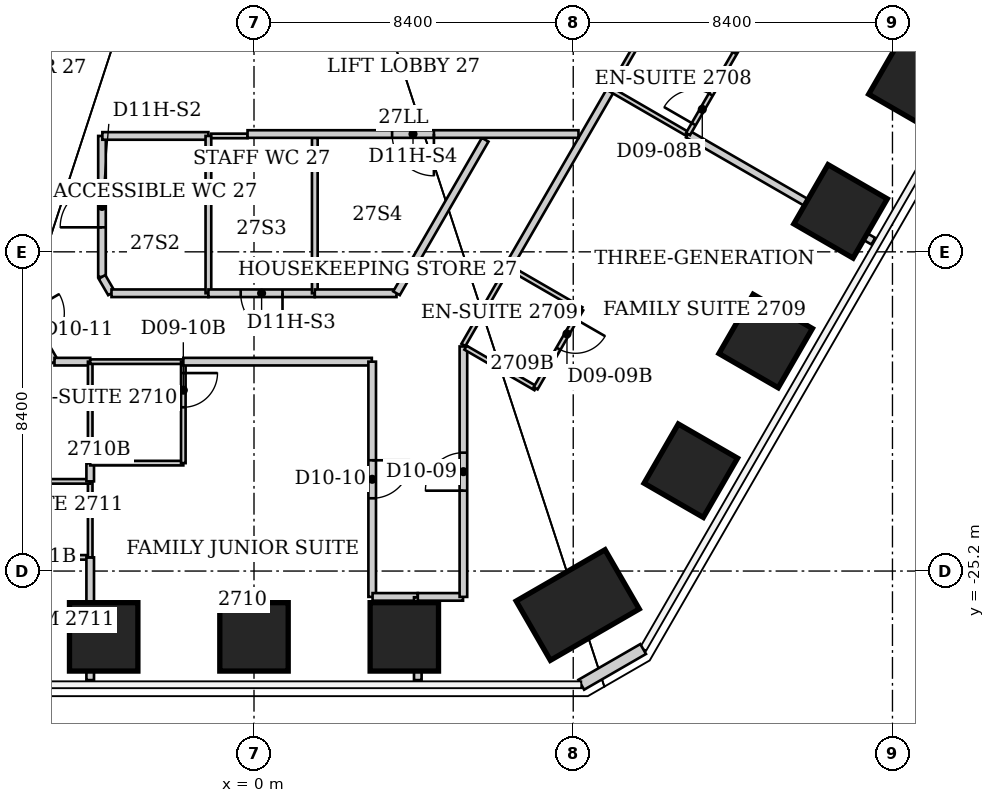
"""IFC4 building model, lengths in metres.
Left out: names, types, materials, properties, quantities, classifications, styles, units other than length and angle.
Written with IfcOpenShell. Run it as: python <this file> out.ifc"""

import sys

from ifc_helpers import new_model, si_unit, direction, frame, frame_2d, origin, origin_2d, place, context, subcontext, project, spatial, rectangle, extrude, element, fill, save


model = new_model("IFC4")
c1 = context("Model", 3, precision=1e-05, world=origin(), true_north=direction((0.0, 1.0)))
c2 = subcontext(c1, "Body", "Model", "MODEL_VIEW")
j1 = project(units=[si_unit("LENGTHUNIT", "METRE"), si_unit("PLANEANGLEUNIT", "RADIAN")], contexts=[c1])
p1 = place(None, origin())
s1 = spatial("IfcSite", under=j1, at=p1, CompositionType="ELEMENT")
p2 = place(p1, origin())
s2 = spatial("IfcBuilding", under=s1, at=p2, CompositionType="ELEMENT")
p3 = place(p2, frame((0.0, 0.0, 112.0)))
s3 = spatial("IfcBuildingStorey", under=s2, at=p3, CompositionType="ELEMENT", Elevation=112.0)
for number, where, z_axis, x_axis in (
    (1, (17.404, -12.323, 0.0), (0.0, 0.0, 1.0), (0.866, -0.5, 0.0)),
    (2, (15.434, -15.735, 0.0), (0.0, 0.0, 1.0), (0.866, -0.5, 0.0)),
    (3, (13.464, -19.147, 0.0), (0.0, 0.0, 1.0), (0.866, -0.5, 0.0)),
    (4, (11.494, -22.559, 0.0), (0.0, 0.0, 1.0), (0.866, -0.5, 0.0)),
):
    element("IfcColumn", number, at=place(p3, frame(where, z_axis=z_axis, x_axis=x_axis)), inside=s3, PredefinedType="COLUMN", context=c2, shape_type="SweptSolid", body=[
        extrude(rectangle(XDim=1.8, YDim=1.8, at=origin_2d()), origin(), (0.0, 0.0, 1.0), 3.8),
    ])
p4 = place(p3, frame((8.518, -26.094, 0.0), z_axis=(0.0, 0.0, 1.0), x_axis=(0.5, -0.866025403784, 0.0)))
e5 = element("IfcColumn", 5, at=p4, inside=s3, PredefinedType="COLUMN", context=c2, shape_type="SweptSolid", body=[
    extrude(rectangle(XDim=1.8, YDim=2.7, at=origin_2d()), origin(), (0.0, 0.0, 1.0), 3.8),
])
for number, where, z_axis, x_axis in (
    (6, (3.955, -26.932, 0.0), (0.0, 0.0, 1.0), (0.0, -1.0, 0.0)),
    (7, (0.0, -26.932, 0.0), (0.0, 0.0, 1.0), (0.0, -1.0, 0.0)),
    (8, (-3.955, -26.932, 0.0), (0.0, 0.0, 1.0), (0.0, -1.0, 0.0)),
):
    element("IfcColumn", number, at=place(p3, frame(where, z_axis=z_axis, x_axis=x_axis)), inside=s3, PredefinedType="COLUMN", context=c2, shape_type="SweptSolid", body=[
        extrude(rectangle(XDim=1.8, YDim=1.8, at=origin_2d()), origin(), (0.0, 0.0, 1.0), 3.8),
    ])
p5 = place(p3, frame((10.24, -27.252, 0.0), z_axis=(0.0, 0.0, 1.0), x_axis=(-0.866045024864, -0.499966013754, 0.0)))
e9 = element("IfcWall", 9, at=p5, inside=s3, PredefinedType="SOLIDWALL", context=c2, shape_type="SweptSolid", body=[
    extrude(rectangle(XDim=1.88, YDim=0.3, at=frame_2d((0.94, 0.0))), origin(), (0.0, 0.0, 1.0), 3.64),
])
p6 = place(p3, frame((-6.71, -24.84, 0.0), z_axis=(0.0, 0.0, 1.0), x_axis=(1.0, 0.0, 0.0)))
e10 = element("IfcWall", 10, at=p6, inside=s3, PredefinedType="PARTITIONING", context=c2, shape_type="SweptSolid", body=[
    extrude(rectangle(XDim=2.4, YDim=0.12, at=frame_2d((1.2, 0.0))), origin(), (0.0, 0.0, 1.0), 3.64),
])
p7 = place(p6, frame((0.45, 0.0, 0.0)))
e11 = element("IfcOpeningElement", 11, at=p7, cuts=e10, PredefinedType="OPENING", context=c2, shape_type="SweptSolid", body=[
    extrude(rectangle(XDim=0.9, YDim=2.03, at=frame_2d((0.45, 1.015))), frame((0.0, 0.06, 0.0), z_axis=(0.0, -1.0, 0.0), x_axis=(1.0, 0.0, 0.0)), (0.0, 0.0, 1.0), 0.12),
])
p8 = place(p3, frame((-6.23, -18.0, 0.0), z_axis=(0.0, 0.0, 1.0), x_axis=(0.501647016168, -0.86507240805, 0.0)))
e12 = element("IfcWall", 12, at=p8, inside=s3, PredefinedType="PARTITIONING", context=c2, shape_type="SweptSolid", body=[
    extrude(rectangle(XDim=1.954, YDim=0.2, at=frame_2d((0.977, 0.0))), origin(), (0.0, 0.0, 1.0), 3.64),
])
p9 = place(p8, frame((0.477, 0.0, 0.0)))
e13 = element("IfcOpeningElement", 13, at=p9, cuts=e12, PredefinedType="OPENING", context=c2, shape_type="SweptSolid", body=[
    extrude(rectangle(XDim=1.0, YDim=2.13, at=frame_2d((0.5, 1.065))), frame((0.0, 0.1, 0.0), z_axis=(0.0, -1.0, 0.0), x_axis=(1.0, 0.0, 0.0)), (0.0, 0.0, 1.0), 0.2),
])
p10 = place(p3, frame((-5.25, -19.69, 0.0), z_axis=(0.0, 0.0, 1.0), x_axis=(1.0, 0.0, 0.0)))
e14 = element("IfcWall", 14, at=p10, inside=s3, PredefinedType="PARTITIONING", context=c2, shape_type="SweptSolid", body=[
    extrude(rectangle(XDim=0.94, YDim=0.2, at=frame_2d((0.47, 0.0))), origin(), (0.0, 0.0, 1.0), 3.64),
])
p11 = place(p3, frame((-4.31, -28.07, 0.0), z_axis=(0.0, 0.0, 1.0), x_axis=(0.0, 1.0, 0.0)))
e15 = element("IfcWall", 15, at=p11, inside=s3, PredefinedType="PARTITIONING", context=c2, shape_type="SweptSolid", body=[
    extrude(rectangle(XDim=3.23, YDim=0.2, at=frame_2d((1.615, 0.0))), origin(), (0.0, 0.0, 1.0), 3.64),
])
p12 = place(p3, frame((-4.31, -24.84, 0.0), z_axis=(0.0, 0.0, 1.0), x_axis=(0.0, 1.0, 0.0)))
e16 = element("IfcWall", 16, at=p12, inside=s3, PredefinedType="PARTITIONING", context=c2, shape_type="SweptSolid", body=[
    extrude(rectangle(XDim=2.0, YDim=0.12, at=frame_2d((1.0, 0.0))), origin(), (0.0, 0.0, 1.0), 3.64),
])
p13 = place(p3, frame((-4.31, -22.84, 0.0), z_axis=(0.0, 0.0, 1.0), x_axis=(-1.0, 0.0, 0.0)))
e17 = element("IfcWall", 17, at=p13, inside=s3, PredefinedType="PARTITIONING", context=c2, shape_type="SweptSolid", body=[
    extrude(rectangle(XDim=2.4, YDim=0.12, at=frame_2d((1.2, 0.0))), origin(), (0.0, 0.0, 1.0), 3.64),
])
p14 = place(p3, frame((-4.31, -22.84, 0.0), z_axis=(0.0, 0.0, 1.0), x_axis=(0.0, 1.0, 0.0)))
e18 = element("IfcWall", 18, at=p14, inside=s3, PredefinedType="PARTITIONING", context=c2, shape_type="SweptSolid", body=[
    extrude(rectangle(XDim=0.48, YDim=0.2, at=frame_2d((0.24, 0.0))), origin(), (0.0, 0.0, 1.0), 3.64),
])
p15 = place(p3, frame((-4.31, -22.36, 0.0), z_axis=(0.0, 0.0, 1.0), x_axis=(0.0, 1.0, 0.0)))
e19 = element("IfcWall", 19, at=p15, inside=s3, PredefinedType="PARTITIONING", context=c2, shape_type="SweptSolid", body=[
    extrude(rectangle(XDim=2.67, YDim=0.12, at=frame_2d((1.335, 0.0))), origin(), (0.0, 0.0, 1.0), 3.64),
])
for number, where, z_axis, x_axis in (
    (20, (-4.31, -22.36, 0.0), (0.0, 0.0, 1.0), (1.0, 0.0, 0.0)),
    (21, (-4.31, -19.69, 0.0), (0.0, 0.0, 1.0), (1.0, 0.0, 0.0)),
):
    element("IfcWall", number, at=place(p3, frame(where, z_axis=z_axis, x_axis=x_axis)), inside=s3, PredefinedType="PARTITIONING", context=c2, shape_type="SweptSolid", body=[
        extrude(rectangle(XDim=2.45, YDim=0.12, at=frame_2d((1.225, 0.0))), origin(), (0.0, 0.0, 1.0), 3.64),
    ])
p16 = place(p3, frame((-4.0, -17.46, 0.0), z_axis=(0.0, 0.0, 1.0), x_axis=(0.0, 1.0, 0.0)))
e22 = element("IfcWall", 22, at=p16, inside=s3, PredefinedType="PARTITIONING", context=c2, shape_type="SweptSolid", body=[
    extrude(rectangle(XDim=3.71, YDim=0.2, at=frame_2d((1.855, 0.0))), origin(), (0.0, 0.0, 1.0), 2.878),
])
p17 = place(p16, frame((1.305, 0.0, 0.0)))
e23 = element("IfcOpeningElement", 23, at=p17, cuts=e22, PredefinedType="OPENING", context=c2, shape_type="SweptSolid", body=[
    extrude(rectangle(XDim=1.1, YDim=2.2, at=frame_2d((0.55, 1.1))), frame((0.0, 0.1, 0.0), z_axis=(0.0, -1.0, 0.0), x_axis=(1.0, 0.0, 0.0)), (0.0, 0.0, 1.0), 0.2),
])
p18 = place(p3, frame((-3.99, -13.75, 0.0), z_axis=(0.0, 0.0, 1.0), x_axis=(1.0, 0.0, 0.0)))
e24 = element("IfcWall", 24, at=p18, inside=s3, PredefinedType="PARTITIONING", context=c2, shape_type="SweptSolid", body=[
    extrude(rectangle(XDim=2.79, YDim=0.2, at=frame_2d((1.395, 0.0))), origin(), (0.0, 0.0, 1.0), 3.64),
])
p19 = place(p3, frame((-3.75, -17.89, 0.0), z_axis=(0.0, 0.0, 1.0), x_axis=(-0.502680181512, 0.864472460588, 0.0)))
e25 = element("IfcWall", 25, at=p19, inside=s3, PredefinedType="PARTITIONING", context=c2, shape_type="SweptSolid", body=[
    extrude(rectangle(XDim=0.497, YDim=0.2, at=frame_2d((0.249, 0.0))), origin(), (0.0, 0.0, 1.0), 3.64),
])
p20 = place(p3, frame((-1.86, -22.36, 0.0), z_axis=(0.0, 0.0, 1.0), x_axis=(0.0, 1.0, 0.0)))
e26 = element("IfcWall", 26, at=p20, inside=s3, PredefinedType="PARTITIONING", context=c2, shape_type="SweptSolid", body=[
    extrude(rectangle(XDim=2.67, YDim=0.12, at=frame_2d((1.335, 0.0))), origin(), (0.0, 0.0, 1.0), 2.86),
])
p21 = place(p20, frame((1.47, 0.0, 0.0)))
e27 = element("IfcOpeningElement", 27, at=p21, cuts=e26, PredefinedType="OPENING", context=c2, shape_type="SweptSolid", body=[
    extrude(rectangle(XDim=0.9, YDim=2.03, at=frame_2d((0.45, 1.015))), frame((0.0, 0.06, 0.0), z_axis=(0.0, -1.0, 0.0), x_axis=(1.0, 0.0, 0.0)), (0.0, 0.0, 1.0), 0.12),
])
p22 = place(p3, frame((-1.86, -19.69, 0.0), z_axis=(0.0, 0.0, 1.0), x_axis=(1.0, 0.0, 0.0)))
e28 = element("IfcWall", 28, at=p22, inside=s3, PredefinedType="PARTITIONING", context=c2, shape_type="SweptSolid", body=[
    extrude(rectangle(XDim=4.96, YDim=0.2, at=frame_2d((2.48, 0.0))), origin(), (0.0, 0.0, 1.0), 3.64),
])
p23 = place(p3, frame((-1.2, -17.89, 0.0), z_axis=(0.0, 0.0, 1.0), x_axis=(-1.0, 0.0, 0.0)))
e29 = element("IfcWall", 29, at=p23, inside=s3, PredefinedType="PARTITIONING", context=c2, shape_type="SweptSolid", body=[
    extrude(rectangle(XDim=2.55, YDim=0.2, at=frame_2d((1.275, 0.0))), origin(), (0.0, 0.0, 1.0), 3.64),
])
p24 = place(p3, frame((-1.2, -13.75, 0.0), z_axis=(0.0, 0.0, 1.0), x_axis=(0.0, -1.0, 0.0)))
e30 = element("IfcWall", 30, at=p24, inside=s3, PredefinedType="PARTITIONING", context=c2, shape_type="SweptSolid", body=[
    extrude(rectangle(XDim=4.14, YDim=0.15, at=frame_2d((2.07, 0.0))), origin(), (0.0, 0.0, 1.0), 3.64),
])
p25 = place(p3, frame((-1.125, -13.75, 0.0), z_axis=(0.0, 0.0, 1.0), x_axis=(1.0, 0.0, 0.0)))
e31 = element("IfcWall", 31, at=p25, inside=s3, PredefinedType="PARTITIONING", context=c2, shape_type="SweptSolid", body=[
    extrude(rectangle(XDim=0.955, YDim=0.12, at=frame_2d((0.478, 0.0))), origin(), (0.0, 0.0, 1.0), 3.64),
])
p26 = place(p3, frame((1.6, -17.89, 0.0), z_axis=(0.0, 0.0, 1.0), x_axis=(-1.0, 0.0, 0.0)))
e32 = element("IfcWall", 32, at=p26, inside=s3, PredefinedType="PARTITIONING", context=c2, shape_type="SweptSolid", body=[
    extrude(rectangle(XDim=2.8, YDim=0.2, at=frame_2d((1.4, 0.0))), origin(), (0.0, 0.0, 1.0), 3.64),
])
p27 = place(p26, frame((0.85, 0.0, 0.0)))
e33 = element("IfcOpeningElement", 33, at=p27, cuts=e32, PredefinedType="OPENING", context=c2, shape_type="SweptSolid", body=[
    extrude(rectangle(XDim=1.1, YDim=2.2, at=frame_2d((0.55, 1.1))), frame((0.0, 0.1, 0.0), z_axis=(0.0, -1.0, 0.0), x_axis=(1.0, 0.0, 0.0)), (0.0, 0.0, 1.0), 0.2),
])
p28 = place(p3, frame((1.6, -13.8, 0.0), z_axis=(0.0, 0.0, 1.0), x_axis=(0.0, -1.0, 0.0)))
e34 = element("IfcWall", 34, at=p28, inside=s3, PredefinedType="PARTITIONING", context=c2, shape_type="SweptSolid", body=[
    extrude(rectangle(XDim=4.09, YDim=0.15, at=frame_2d((2.045, 0.0))), origin(), (0.0, 0.0, 1.0), 3.64),
])
p29 = place(p3, frame((3.11, -19.69, 0.0), z_axis=(0.0, 0.0, 1.0), x_axis=(0.0, -1.0, 0.0)))
e35 = element("IfcWall", 35, at=p29, inside=s3, PredefinedType="PARTITIONING", context=c2, shape_type="SweptSolid", body=[
    extrude(rectangle(XDim=6.19, YDim=0.2, at=frame_2d((3.095, 0.0))), origin(), (0.0, 0.0, 1.0), 3.64),
])
p30 = place(p29, frame((2.595, 0.0, 0.0)))
e36 = element("IfcOpeningElement", 36, at=p30, cuts=e35, PredefinedType="OPENING", context=c2, shape_type="SweptSolid", body=[
    extrude(rectangle(XDim=1.0, YDim=2.13, at=frame_2d((0.5, 1.065))), frame((0.0, 0.1, 0.0), z_axis=(0.0, -1.0, 0.0), x_axis=(1.0, 0.0, 0.0)), (0.0, 0.0, 1.0), 0.2),
])
p31 = place(p3, frame((3.12, -25.88, 0.0), z_axis=(0.0, 0.0, 1.0), x_axis=(1.0, 0.0, 0.0)))
e37 = element("IfcWall", 37, at=p31, inside=s3, PredefinedType="PARTITIONING", context=c2, shape_type="SweptSolid", body=[
    extrude(rectangle(XDim=1.19, YDim=0.2, at=frame_2d((0.595, 0.0))), origin(), (0.0, 0.0, 1.0), 3.64),
])
p32 = place(p3, frame((3.75, -17.89, 0.0), z_axis=(0.0, 0.0, 1.0), x_axis=(-1.0, 0.0, 0.0)))
e38 = element("IfcWall", 38, at=p32, inside=s3, PredefinedType="PARTITIONING", context=c2, shape_type="SweptSolid", body=[
    extrude(rectangle(XDim=2.15, YDim=0.2, at=frame_2d((1.075, 0.0))), origin(), (0.0, 0.0, 1.0), 3.64),
])
p33 = place(p3, frame((4.31, -28.07, 0.0), z_axis=(0.0, 0.0, 1.0), x_axis=(0.0, 1.0, 0.0)))
e39 = element("IfcWall", 39, at=p33, inside=s3, PredefinedType="PARTITIONING", context=c2, shape_type="SweptSolid", body=[
    extrude(rectangle(XDim=2.18, YDim=0.2, at=frame_2d((1.09, 0.0))), origin(), (0.0, 0.0, 1.0), 3.64),
])
p34 = place(p3, frame((4.31, -25.88, 0.0), z_axis=(0.0, 0.0, 1.0), x_axis=(1.0, 0.0, 0.0)))
e40 = element("IfcWall", 40, at=p34, inside=s3, PredefinedType="PARTITIONING", context=c2, shape_type="SweptSolid", body=[
    extrude(rectangle(XDim=1.19, YDim=0.2, at=frame_2d((0.595, 0.0))), origin(), (0.0, 0.0, 1.0), 3.64),
])
p35 = place(p3, frame((5.51, -25.88, 0.0), z_axis=(0.0, 0.0, 1.0), x_axis=(0.0, 1.0, 0.0)))
e41 = element("IfcWall", 41, at=p35, inside=s3, PredefinedType="PARTITIONING", context=c2, shape_type="SweptSolid", body=[
    extrude(rectangle(XDim=6.59, YDim=0.2, at=frame_2d((3.295, 0.0))), origin(), (0.0, 0.0, 1.0), 3.64),
])
p36 = place(p35, frame((2.795, 0.0, 0.0)))
e42 = element("IfcOpeningElement", 42, at=p36, cuts=e41, PredefinedType="OPENING", context=c2, shape_type="SweptSolid", body=[
    extrude(rectangle(XDim=1.0, YDim=2.13, at=frame_2d((0.5, 1.065))), frame((0.0, 0.1, 0.0), z_axis=(0.0, -1.0, 0.0), x_axis=(1.0, 0.0, 0.0)), (0.0, 0.0, 1.0), 0.2),
])
p37 = place(p3, frame((5.51, -19.25, 0.0), z_axis=(0.0, 0.0, 1.0), x_axis=(0.498837591974, 0.866695481028, 0.0)))
e43 = element("IfcWall", 43, at=p37, inside=s3, PredefinedType="PARTITIONING", context=c2, shape_type="SweptSolid", body=[
    extrude(rectangle(XDim=2.365, YDim=0.12, at=frame_2d((1.183, 0.0))), origin(), (0.0, 0.0, 1.0), 3.64),
])
p38 = place(p3, frame((5.566, -19.323, 0.0), z_axis=(0.0, 0.0, 1.0), x_axis=(0.865436746432, -0.501018201192, 0.0)))
e44 = element("IfcWall", 44, at=p38, inside=s3, PredefinedType="PARTITIONING", context=c2, shape_type="SweptSolid", body=[
    extrude(rectangle(XDim=2.13, YDim=0.12, at=frame_2d((1.065, 0.0))), origin(), (0.0, 0.0, 1.0), 3.64),
])
p39 = place(p3, frame((6.083, -13.85, 0.0), z_axis=(0.0, 0.0, 1.0), x_axis=(-0.499977643516, -0.866038310922, 0.0)))
e45 = element("IfcWall", 45, at=p39, inside=s3, PredefinedType="PARTITIONING", context=c2, shape_type="SweptSolid", body=[
    extrude(rectangle(XDim=4.665, YDim=0.2, at=frame_2d((2.333, 0.0))), origin(), (0.0, 0.0, 1.0), 3.64),
])
p40 = place(p3, frame((6.69, -17.2, 0.0), z_axis=(0.0, 0.0, 1.0), x_axis=(0.500524150216, 0.865722573952, 0.0)))
e46 = element("IfcWall", 46, at=p40, inside=s3, PredefinedType="PARTITIONING", context=c2, shape_type="SweptSolid", body=[
    extrude(rectangle(XDim=5.394, YDim=0.2, at=frame_2d((2.697, 0.0))), origin(), (0.0, 0.0, 1.0), 3.64),
])
p41 = place(p3, frame((7.41, -20.39, 0.0), z_axis=(0.0, 0.0, 1.0), x_axis=(0.499737123639, 0.866177122335, 0.0)))
e47 = element("IfcWall", 47, at=p41, inside=s3, PredefinedType="PARTITIONING", context=c2, shape_type="SweptSolid", body=[
    extrude(rectangle(XDim=2.401, YDim=0.12, at=frame_2d((1.201, 0.0))), origin(), (0.0, 0.0, 1.0), 3.64),
])
p42 = place(p41, frame((1.201, 0.0, 0.0)))
e48 = element("IfcOpeningElement", 48, at=p42, cuts=e47, PredefinedType="OPENING", context=c2, shape_type="SweptSolid", body=[
    extrude(rectangle(XDim=0.9, YDim=2.03, at=frame_2d((0.45, 1.015))), frame((0.0, 0.06, 0.0), z_axis=(0.0, -1.0, 0.0), x_axis=(1.0, 0.0, 0.0)), (0.0, 0.0, 1.0), 0.12),
])
p43 = place(p3, frame((8.538, -13.7, 0.0), z_axis=(0.0, 0.0, 1.0), x_axis=(-1.0, 0.0, 0.0)))
e49 = element("IfcWall", 49, at=p43, inside=s3, PredefinedType="PARTITIONING", context=c2, shape_type="SweptSolid", body=[
    extrude(rectangle(XDim=8.708, YDim=0.2, at=frame_2d((4.354, 0.0))), origin(), (0.0, 0.0, 1.0), 3.64),
])
p44 = place(p43, frame((3.804, 0.0, 0.0)))
e50 = element("IfcOpeningElement", 50, at=p44, cuts=e49, PredefinedType="OPENING", context=c2, shape_type="SweptSolid", body=[
    extrude(rectangle(XDim=1.1, YDim=2.2, at=frame_2d((0.55, 1.1))), frame((0.0, 0.1, 0.0), z_axis=(0.0, -1.0, 0.0), x_axis=(1.0, 0.0, 0.0)), (0.0, 0.0, 1.0), 0.2),
])
p45 = place(p3, frame((8.61, -18.31, 0.0), z_axis=(0.0, 0.0, 1.0), x_axis=(-0.865732595383, 0.500506816428, 0.0)))
e51 = element("IfcWall", 51, at=p45, inside=s3, PredefinedType="PARTITIONING", context=c2, shape_type="SweptSolid", body=[
    extrude(rectangle(XDim=2.218, YDim=0.12, at=frame_2d((1.109, 0.0))), origin(), (0.0, 0.0, 1.0), 3.64),
])
p46 = place(p3, frame((9.387, -12.528, 0.0), z_axis=(0.0, 0.0, 1.0), x_axis=(0.499797743474, 0.866142145158, 0.0)))
e52 = element("IfcWall", 52, at=p46, inside=s3, PredefinedType="PARTITIONING", context=c2, shape_type="SweptSolid", body=[
    extrude(rectangle(XDim=2.526, YDim=0.12, at=frame_2d((1.263, 0.0))), origin(), (0.0, 0.0, 1.0), 3.64),
])
p47 = place(p3, frame((9.39, -12.53, 0.0), z_axis=(0.0, 0.0, 1.0), x_axis=(0.865459574701, -0.500978766574, 0.0)))
e53 = element("IfcWall", 53, at=p47, inside=s3, PredefinedType="PARTITIONING", context=c2, shape_type="SweptSolid", body=[
    extrude(rectangle(XDim=2.343, YDim=0.12, at=frame_2d((1.171, 0.0))), origin(), (0.0, 0.0, 1.0), 3.64),
])
p48 = place(p3, frame((11.418, -13.704, 0.0), z_axis=(0.0, 0.0, 1.0), x_axis=(0.866055675731, -0.499947563785, 0.0)))
e54 = element("IfcWall", 54, at=p48, inside=s3, PredefinedType="PARTITIONING", context=c2, shape_type="SweptSolid", body=[
    extrude(rectangle(XDim=5.633, YDim=0.2, at=frame_2d((2.816, 0.0))), origin(), (0.0, 0.0, 1.0), 3.64),
])
p49 = place(p3, frame((11.42, -13.7, 0.0), z_axis=(0.0, 0.0, 1.0), x_axis=(0.500424596343, 0.865780124151, 0.0)))
e55 = element("IfcWall", 55, at=p49, inside=s3, PredefinedType="PARTITIONING", context=c2, shape_type="SweptSolid", body=[
    extrude(rectangle(XDim=2.518, YDim=0.12, at=frame_2d((1.259, 0.0))), origin(), (0.0, 0.0, 1.0), 3.64),
])
p50 = place(p49, frame((0.3, 0.0, 0.0)))
e56 = element("IfcOpeningElement", 56, at=p50, cuts=e55, PredefinedType="OPENING", context=c2, shape_type="SweptSolid", body=[
    extrude(rectangle(XDim=0.9, YDim=2.03, at=frame_2d((0.45, 1.015))), frame((0.0, 0.06, 0.0), z_axis=(0.0, -1.0, 0.0), x_axis=(1.0, 0.0, 0.0)), (0.0, 0.0, 1.0), 0.12),
])
p51 = place(p3, frame((12.68, -11.52, 0.0), z_axis=(0.0, 0.0, 1.0), x_axis=(-0.864539759309, 0.502564428282, 0.0)))
e57 = element("IfcWall", 57, at=p51, inside=s3, PredefinedType="PARTITIONING", context=c2, shape_type="SweptSolid", body=[
    extrude(rectangle(XDim=2.348, YDim=0.12, at=frame_2d((1.174, 0.0))), origin(), (0.0, 0.0, 1.0), 3.64),
])
p52 = place(p50, origin())
e58 = element("IfcDoor", 58, at=p52, inside=s3, OperationType="SINGLE_SWING_LEFT", PredefinedType="DOOR", context=c2, shape_type="SweptSolid", body=[
    extrude(rectangle(XDim=0.9, YDim=2.03, at=frame_2d((0.45, 1.015))), frame((0.0, 0.025, 0.0), z_axis=(0.0, -1.0, 0.0), x_axis=(1.0, 0.0, 0.0)), (0.0, 0.0, 1.0), 0.05),
])
fill(e56, e58)
p53 = place(p36, origin())
e59 = element("IfcDoor", 59, at=p53, inside=s3, OperationType="SINGLE_SWING_LEFT", PredefinedType="DOOR", context=c2, shape_type="SweptSolid", body=[
    extrude(rectangle(XDim=1.0, YDim=2.13, at=frame_2d((0.5, 1.065))), frame((0.0, 0.025, 0.0), z_axis=(0.0, -1.0, 0.0), x_axis=(1.0, 0.0, 0.0)), (0.0, 0.0, 1.0), 0.05),
])
fill(e42, e59)
p54 = place(p42, origin())
e60 = element("IfcDoor", 60, at=p54, inside=s3, OperationType="SINGLE_SWING_RIGHT", PredefinedType="DOOR", context=c2, shape_type="SweptSolid", body=[
    extrude(rectangle(XDim=0.9, YDim=2.03, at=frame_2d((0.45, 1.015))), frame((0.0, 0.025, 0.0), z_axis=(0.0, -1.0, 0.0), x_axis=(1.0, 0.0, 0.0)), (0.0, 0.0, 1.0), 0.05),
])
fill(e48, e60)
p55 = place(p30, origin())
e61 = element("IfcDoor", 61, at=p55, inside=s3, OperationType="SINGLE_SWING_LEFT", PredefinedType="DOOR", context=c2, shape_type="SweptSolid", body=[
    extrude(rectangle(XDim=1.0, YDim=2.13, at=frame_2d((0.5, 1.065))), frame((0.0, 0.025, 0.0), z_axis=(0.0, -1.0, 0.0), x_axis=(1.0, 0.0, 0.0)), (0.0, 0.0, 1.0), 0.05),
])
fill(e36, e61)
p56 = place(p21, origin())
e62 = element("IfcDoor", 62, at=p56, inside=s3, OperationType="SINGLE_SWING_RIGHT", PredefinedType="DOOR", context=c2, shape_type="SweptSolid", body=[
    extrude(rectangle(XDim=0.9, YDim=2.03, at=frame_2d((0.45, 1.015))), frame((0.0, 0.025, 0.0), z_axis=(0.0, -1.0, 0.0), x_axis=(1.0, 0.0, 0.0)), (0.0, 0.0, 1.0), 0.05),
])
fill(e27, e62)
p57 = place(p17, origin())
e63 = element("IfcDoor", 63, at=p57, inside=s3, OperationType="SINGLE_SWING_LEFT", PredefinedType="DOOR", context=c2, shape_type="SweptSolid", body=[
    extrude(rectangle(XDim=1.1, YDim=2.2, at=frame_2d((0.55, 1.1))), frame((0.0, 0.025, 0.0), z_axis=(0.0, -1.0, 0.0), x_axis=(1.0, 0.0, 0.0)), (0.0, 0.0, 1.0), 0.05),
])
fill(e23, e63)
p58 = place(p27, origin())
e64 = element("IfcDoor", 64, at=p58, inside=s3, OperationType="SINGLE_SWING_LEFT", PredefinedType="DOOR", context=c2, shape_type="SweptSolid", body=[
    extrude(rectangle(XDim=1.1, YDim=2.2, at=frame_2d((0.55, 1.1))), frame((0.0, 0.025, 0.0), z_axis=(0.0, -1.0, 0.0), x_axis=(1.0, 0.0, 0.0)), (0.0, 0.0, 1.0), 0.05),
])
fill(e33, e64)
p59 = place(p44, origin())
e65 = element("IfcDoor", 65, at=p59, inside=s3, OperationType="SINGLE_SWING_LEFT", PredefinedType="DOOR", context=c2, shape_type="SweptSolid", body=[
    extrude(rectangle(XDim=1.1, YDim=2.2, at=frame_2d((0.55, 1.1))), frame((0.0, 0.025, 0.0), z_axis=(0.0, -1.0, 0.0), x_axis=(1.0, 0.0, 0.0)), (0.0, 0.0, 1.0), 0.05),
])
fill(e50, e65)
save(model, sys.argv[1])
